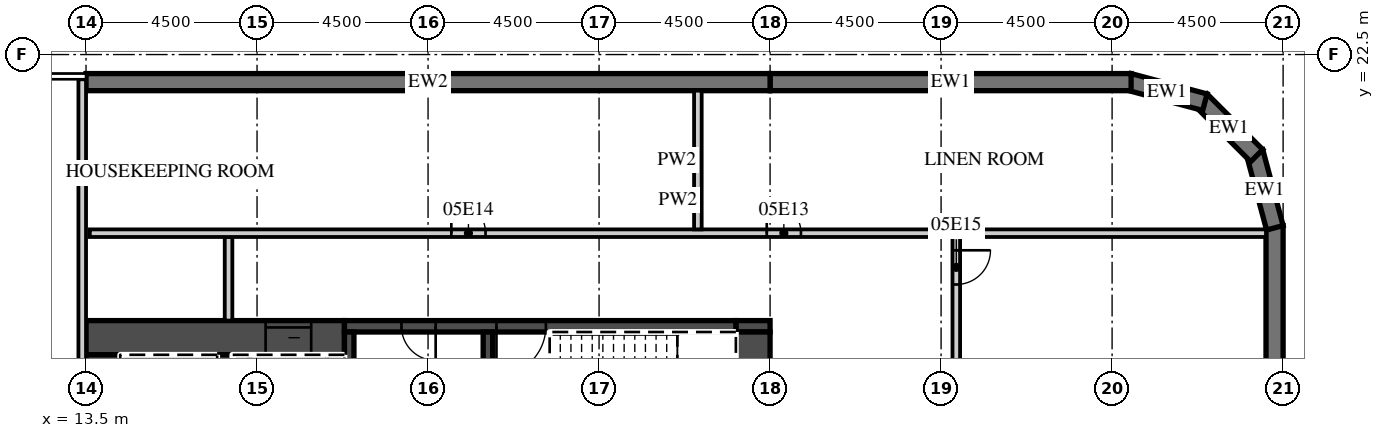
"""IFC4 building model, lengths in metres.
Left out: names, types, materials, properties, quantities, classifications, styles, units other than length and angle.
Written with IfcOpenShell. Run it as: python <this file> out.ifc"""

import sys

from ifc_helpers import new_model, si_unit, direction, frame, frame_2d, origin, place, context, subcontext, project, spatial, polyline, rectangle, outline, extrude, element, fill, save


model = new_model("IFC4")
c1 = context("Model", 3, precision=1e-05, world=origin(), true_north=direction((0.0, 1.0)))
c2 = subcontext(c1, "Body", "Model", "MODEL_VIEW")
j1 = project(units=[si_unit("LENGTHUNIT", "METRE"), si_unit("PLANEANGLEUNIT", "RADIAN")], contexts=[c1])
p1 = place(None, origin())
s1 = spatial("IfcSite", under=j1, at=p1, CompositionType="ELEMENT")
p2 = place(p1, origin())
s2 = spatial("IfcBuilding", under=s1, at=p2, CompositionType="ELEMENT")
p3 = place(p2, frame((0.0, 0.0, 33.5)))
s3 = spatial("IfcBuildingStorey", under=s2, at=p3, CompositionType="ELEMENT", Elevation=33.5)
p4 = place(p3, frame((44.775, -18.0, 0.0), z_axis=(0.0, 0.0, 1.0), x_axis=(0.0, 1.0, 0.0)))
e1 = element("IfcWall", 1, at=p4, inside=s3, PredefinedType="SOLIDWALL", context=c2, shape_type="SweptSolid", body=[
    extrude(rectangle(XDim=36.0, YDim=0.45, at=frame_2d((18.0, 0.0))), origin(), (0.0, 0.0, 1.0), 4.05),
])
p5 = place(p4, frame((4.05, 0.0, 0.9)))
e2 = element("IfcOpeningElement", 2, at=p5, cuts=e1, PredefinedType="OPENING", context=c2, shape_type="SweptSolid", body=[
    extrude(rectangle(XDim=3.0, YDim=1.8, at=frame_2d((1.5, 0.9))), frame((0.0, 0.235, 0.0), z_axis=(0.0, -1.0, 0.0), x_axis=(1.0, 0.0, 0.0)), (0.0, 0.0, 1.0), 0.47),
])
p6 = place(p3, frame((44.783, 17.942, 0.0), z_axis=(0.0, 0.0, 1.0), x_axis=(-0.25881466832, 0.965926999034, 0.0)))
e3 = element("IfcWall", 3, at=p6, inside=s3, PredefinedType="SOLIDWALL", context=c2, shape_type="SweptSolid", body=[
    extrude(outline(polyline([(0.0, -0.225), (2.071, -0.225), (1.95, 0.225), (0.121, 0.225), (0.0, -0.225)])), origin(), (0.0, 0.0, 1.0), 4.05),
])
p7 = place(p3, frame((44.305, 19.841, 0.0), z_axis=(0.0, 0.0, 1.0), x_axis=(-0.707106781187, 0.707106781187, 0.0)))
e4 = element("IfcWall", 4, at=p7, inside=s3, PredefinedType="SOLIDWALL", context=c2, shape_type="SweptSolid", body=[
    extrude(outline(polyline([(0.0, -0.225), (2.071, -0.225), (1.95, 0.225), (0.121, 0.225), (0.0, -0.225)])), origin(), (0.0, 0.0, 1.0), 4.05),
])
p8 = place(p3, frame((42.942, 21.247, 0.0), z_axis=(0.0, 0.0, 1.0), x_axis=(-0.965926999034, 0.25881466832, 0.0)))
e5 = element("IfcWall", 5, at=p8, inside=s3, PredefinedType="SOLIDWALL", context=c2, shape_type="SweptSolid", body=[
    extrude(outline(polyline([(-0.0, -0.225), (2.07, -0.225), (1.95, 0.225), (0.12, 0.225), (-0.0, -0.225)])), origin(), (0.0, 0.0, 1.0), 4.05),
])
p9 = place(p3, frame((41.0, 21.775, 0.0), z_axis=(0.0, 0.0, 1.0), x_axis=(-1.0, 0.0, 0.0)))
e6 = element("IfcWall", 6, at=p9, inside=s3, PredefinedType="SOLIDWALL", context=c2, shape_type="SweptSolid", body=[
    extrude(rectangle(XDim=9.5, YDim=0.45, at=frame_2d((4.75, 0.0))), origin(), (0.0, 0.0, 1.0), 4.05),
])
p10 = place(p3, frame((31.5, 21.775, 0.0), z_axis=(0.0, 0.0, 1.0), x_axis=(-1.0, 0.0, 0.0)))
e7 = element("IfcWall", 7, at=p10, inside=s3, PredefinedType="SOLIDWALL", context=c2, shape_type="SweptSolid", body=[
    extrude(rectangle(XDim=18.0, YDim=0.45, at=frame_2d((9.0, 0.0))), origin(), (0.0, 0.0, 1.0), 4.05),
])
p11 = place(p3, frame((13.5, 15.05, 0.0), z_axis=(0.0, 0.0, 1.0), x_axis=(1.0, 0.0, 0.0)))
e8 = element("IfcWall", 8, at=p11, inside=s3, PredefinedType="SHEAR", context=c2, shape_type="SweptSolid", body=[
    extrude(rectangle(XDim=6.8, YDim=0.9, at=frame_2d((3.4, 0.0))), origin(), (0.0, 0.0, 1.0), 4.05),
])
p12 = place(p11, frame((4.725, 0.0, 0.0)))
e9 = element("IfcOpeningElement", 9, at=p12, cuts=e8, PredefinedType="OPENING", context=c2, shape_type="SweptSolid", body=[
    extrude(rectangle(XDim=1.2, YDim=2.1, at=frame_2d((0.6, 1.05))), frame((0.0, 0.46, 0.0), z_axis=(0.0, -1.0, 0.0), x_axis=(1.0, 0.0, 0.0)), (0.0, 0.0, 1.0), 0.92),
])
p13 = place(p3, frame((30.6, 15.35, 0.0), z_axis=(0.0, 0.0, 1.0), x_axis=(1.0, 0.0, 0.0)))
e10 = element("IfcWall", 10, at=p13, inside=s3, PredefinedType="SHEAR", context=c2, shape_type="SweptSolid", body=[
    extrude(rectangle(XDim=0.9, YDim=0.3, at=frame_2d((0.45, 0.0))), origin(), (0.0, 0.0, 1.0), 4.05),
])
p14 = place(p3, frame((20.3, 15.35, 0.0), z_axis=(0.0, 0.0, 1.0), x_axis=(1.0, 0.0, 0.0)))
e11 = element("IfcWall", 11, at=p14, inside=s3, PredefinedType="SHEAR", context=c2, shape_type="SweptSolid", body=[
    extrude(rectangle(XDim=10.3, YDim=0.3, at=frame_2d((5.15, 0.0))), origin(), (0.0, 0.0, 1.0), 4.05),
])
p15 = place(p14, frame((4.0, 0.0, 0.0)))
e12 = element("IfcOpeningElement", 12, at=p15, cuts=e11, PredefinedType="OPENING", context=c2, shape_type="SweptSolid", body=[
    extrude(rectangle(XDim=1.3, YDim=2.1, at=frame_2d((0.65, 1.05))), frame((0.0, 0.16, 0.0), z_axis=(0.0, -1.0, 0.0), x_axis=(1.0, 0.0, 0.0)), (0.0, 0.0, 1.0), 0.32),
])
p16 = place(p14, frame((1.5, 0.0, 0.0)))
e13 = element("IfcOpeningElement", 13, at=p16, cuts=e11, PredefinedType="OPENING", context=c2, shape_type="SweptSolid", body=[
    extrude(rectangle(XDim=0.9, YDim=2.1, at=frame_2d((0.45, 1.05))), frame((0.0, 0.16, 0.0), z_axis=(0.0, -1.0, 0.0), x_axis=(1.0, 0.0, 0.0)), (0.0, 0.0, 1.0), 0.32),
])
p17 = place(p3, frame((31.05, 2.4, 0.0), z_axis=(0.0, 0.0, 1.0), x_axis=(0.0, 1.0, 0.0)))
e14 = element("IfcWall", 14, at=p17, inside=s3, PredefinedType="SHEAR", context=c2, shape_type="SweptSolid", body=[
    extrude(rectangle(XDim=12.8, YDim=0.9, at=frame_2d((6.4, 0.0))), origin(), (0.0, 0.0, 1.0), 4.05),
])
p18 = place(p17, frame((0.2, 0.0, 0.0)))
e15 = element("IfcOpeningElement", 15, at=p18, cuts=e14, PredefinedType="OPENING", context=c2, shape_type="SweptSolid", body=[
    extrude(rectangle(XDim=1.1, YDim=2.1, at=frame_2d((0.55, 1.05))), frame((0.0, 0.46, 0.0), z_axis=(0.0, -1.0, 0.0), x_axis=(1.0, 0.0, 0.0)), (0.0, 0.0, 1.0), 0.92),
])
p19 = place(p3, frame((13.95, 2.4, 0.0), z_axis=(0.0, 0.0, 1.0), x_axis=(0.0, 1.0, 0.0)))
e16 = element("IfcWall", 16, at=p19, inside=s3, PredefinedType="SHEAR", context=c2, shape_type="SweptSolid", body=[
    extrude(rectangle(XDim=12.2, YDim=0.9, at=frame_2d((6.1, 0.0))), origin(), (0.0, 0.0, 1.0), 4.05),
])
p20 = place(p3, frame((17.15, 8.8, 0.0), z_axis=(0.0, 0.0, 1.0), x_axis=(0.0, 1.0, 0.0)))
e17 = element("IfcWall", 17, at=p20, inside=s3, PredefinedType="SHEAR", context=c2, shape_type="SweptSolid", body=[
    extrude(rectangle(XDim=5.8, YDim=0.4, at=frame_2d((2.9, 0.0))), origin(), (0.0, 0.0, 1.0), 4.05),
])
for number, where, z_axis, x_axis in (
    (18, (20.425, 11.95, 0.0), (0.0, 0.0, 1.0), (0.0, 1.0, 0.0)),
    (19, (24.075, 11.95, 0.0), (0.0, 0.0, 1.0), (0.0, 1.0, 0.0)),
):
    element("IfcWall", number, at=place(p3, frame(where, z_axis=z_axis, x_axis=x_axis)), inside=s3, PredefinedType="SHEAR", context=c2, shape_type="SweptSolid", body=[
        extrude(rectangle(XDim=3.25, YDim=0.25, at=frame_2d((1.625, 0.0))), origin(), (0.0, 0.0, 1.0), 4.05),
    ])
p21 = place(p3, frame((17.25, 15.5, 0.0), z_axis=(0.0, 0.0, 1.0), x_axis=(0.0, 1.0, 0.0)))
e20 = element("IfcWall", 20, at=p21, inside=s3, PredefinedType="PARTITIONING", context=c2, shape_type="SweptSolid", body=[
    extrude(rectangle(XDim=2.2, YDim=0.2, at=frame_2d((1.1, 0.0))), origin(), (0.0, 0.0, 1.0), 4.05),
])
p22 = place(p3, frame((36.4, 1.75, 0.0), z_axis=(0.0, 0.0, 1.0), x_axis=(0.0, 1.0, 0.0)))
e21 = element("IfcWall", 21, at=p22, inside=s3, PredefinedType="PARTITIONING", context=c2, shape_type="SweptSolid", body=[
    extrude(rectangle(XDim=15.95, YDim=0.2, at=frame_2d((7.975, 0.0))), origin(), (0.0, 0.0, 1.0), 4.05),
])
p23 = place(p22, frame((14.7, 0.0, 0.0)))
e22 = element("IfcOpeningElement", 22, at=p23, cuts=e21, PredefinedType="OPENING", context=c2, shape_type="SweptSolid", body=[
    extrude(rectangle(XDim=0.9, YDim=2.1, at=frame_2d((0.45, 1.05))), frame((0.0, 0.11, 0.0), z_axis=(0.0, -1.0, 0.0), x_axis=(1.0, 0.0, 0.0)), (0.0, 0.0, 1.0), 0.22),
])
p24 = place(p3, frame((13.6, 17.8, 0.0), z_axis=(0.0, 0.0, 1.0), x_axis=(1.0, 0.0, 0.0)))
e23 = element("IfcWall", 23, at=p24, inside=s3, PredefinedType="PARTITIONING", context=c2, shape_type="SweptSolid", body=[
    extrude(rectangle(XDim=30.95, YDim=0.2, at=frame_2d((15.475, 0.0))), origin(), (0.0, 0.0, 1.0), 4.05),
])
p25 = place(p24, frame((17.812, 0.0, 0.0)))
e24 = element("IfcOpeningElement", 24, at=p25, cuts=e23, PredefinedType="OPENING", context=c2, shape_type="SweptSolid", body=[
    extrude(rectangle(XDim=0.9, YDim=2.1, at=frame_2d((0.45, 1.05))), frame((0.0, 0.11, 0.0), z_axis=(0.0, -1.0, 0.0), x_axis=(1.0, 0.0, 0.0)), (0.0, 0.0, 1.0), 0.22),
])
p26 = place(p24, frame((9.512, 0.0, 0.0)))
e25 = element("IfcOpeningElement", 25, at=p26, cuts=e23, PredefinedType="OPENING", context=c2, shape_type="SweptSolid", body=[
    extrude(rectangle(XDim=0.9, YDim=2.1, at=frame_2d((0.45, 1.05))), frame((0.0, 0.11, 0.0), z_axis=(0.0, -1.0, 0.0), x_axis=(1.0, 0.0, 0.0)), (0.0, 0.0, 1.0), 0.22),
])
p27 = place(p3, frame((29.6, 17.9, 0.0), z_axis=(0.0, 0.0, 1.0), x_axis=(0.0, 1.0, 0.0)))
e26 = element("IfcWall", 26, at=p27, inside=s3, PredefinedType="PARTITIONING", context=c2, shape_type="SweptSolid", body=[
    extrude(rectangle(XDim=3.65, YDim=0.2, at=frame_2d((1.825, 0.0))), origin(), (0.0, 0.0, 1.0), 4.05),
])
p28 = place(p3, frame((13.4, 1.7, 0.0), z_axis=(0.0, 0.0, 1.0), x_axis=(0.0, 1.0, 0.0)))
e27 = element("IfcWall", 27, at=p28, inside=s3, PredefinedType="PARTITIONING", context=c2, shape_type="SweptSolid", body=[
    extrude(rectangle(XDim=20.15, YDim=0.2, at=frame_2d((10.075, 0.0))), origin(), (0.0, 0.0, 1.0), 4.05),
])
p29 = place(p12, origin())
e28 = element("IfcDoor", 28, at=p29, inside=s3, OperationType="SLIDING_TO_LEFT", PredefinedType="DOOR", context=c2, shape_type="SweptSolid", body=[
    extrude(rectangle(XDim=1.2, YDim=2.1, at=frame_2d((0.6, 1.05))), frame((0.0, 0.025, 0.0), z_axis=(0.0, -1.0, 0.0), x_axis=(1.0, 0.0, 0.0)), (0.0, 0.0, 1.0), 0.05),
])
fill(e9, e28)
p30 = place(p15, origin())
e29 = element("IfcDoor", 29, at=p30, inside=s3, OperationType="SINGLE_SWING_LEFT", PredefinedType="DOOR", context=c2, shape_type="SweptSolid", body=[
    extrude(rectangle(XDim=1.3, YDim=2.1, at=frame_2d((0.65, 1.05))), frame((0.0, 0.025, 0.0), z_axis=(0.0, -1.0, 0.0), x_axis=(1.0, 0.0, 0.0)), (0.0, 0.0, 1.0), 0.05),
])
fill(e12, e29)
p31 = place(p16, origin())
e30 = element("IfcDoor", 30, at=p31, inside=s3, OperationType="SINGLE_SWING_RIGHT", PredefinedType="DOOR", context=c2, shape_type="SweptSolid", body=[
    extrude(rectangle(XDim=0.9, YDim=2.1, at=frame_2d((0.45, 1.05))), frame((0.0, 0.025, 0.0), z_axis=(0.0, -1.0, 0.0), x_axis=(1.0, 0.0, 0.0)), (0.0, 0.0, 1.0), 0.05),
])
fill(e13, e30)
p32 = place(p25, origin())
e31 = element("IfcDoor", 31, at=p32, inside=s3, OperationType="SINGLE_SWING_LEFT", PredefinedType="DOOR", context=c2, shape_type="SweptSolid", body=[
    extrude(rectangle(XDim=0.9, YDim=2.1, at=frame_2d((0.45, 1.05))), frame((0.0, 0.025, 0.0), z_axis=(0.0, -1.0, 0.0), x_axis=(1.0, 0.0, 0.0)), (0.0, 0.0, 1.0), 0.05),
])
fill(e24, e31)
p33 = place(p26, origin())
e32 = element("IfcDoor", 32, at=p33, inside=s3, OperationType="SINGLE_SWING_LEFT", PredefinedType="DOOR", context=c2, shape_type="SweptSolid", body=[
    extrude(rectangle(XDim=0.9, YDim=2.1, at=frame_2d((0.45, 1.05))), frame((0.0, 0.025, 0.0), z_axis=(0.0, -1.0, 0.0), x_axis=(1.0, 0.0, 0.0)), (0.0, 0.0, 1.0), 0.05),
])
fill(e25, e32)
p34 = place(p23, origin())
e33 = element("IfcDoor", 33, at=p34, inside=s3, OperationType="SINGLE_SWING_RIGHT", PredefinedType="DOOR", context=c2, shape_type="SweptSolid", body=[
    extrude(rectangle(XDim=0.9, YDim=2.1, at=frame_2d((0.45, 1.05))), frame((0.0, 0.025, 0.0), z_axis=(0.0, -1.0, 0.0), x_axis=(1.0, 0.0, 0.0)), (0.0, 0.0, 1.0), 0.05),
])
fill(e22, e33)
save(model, sys.argv[1])
